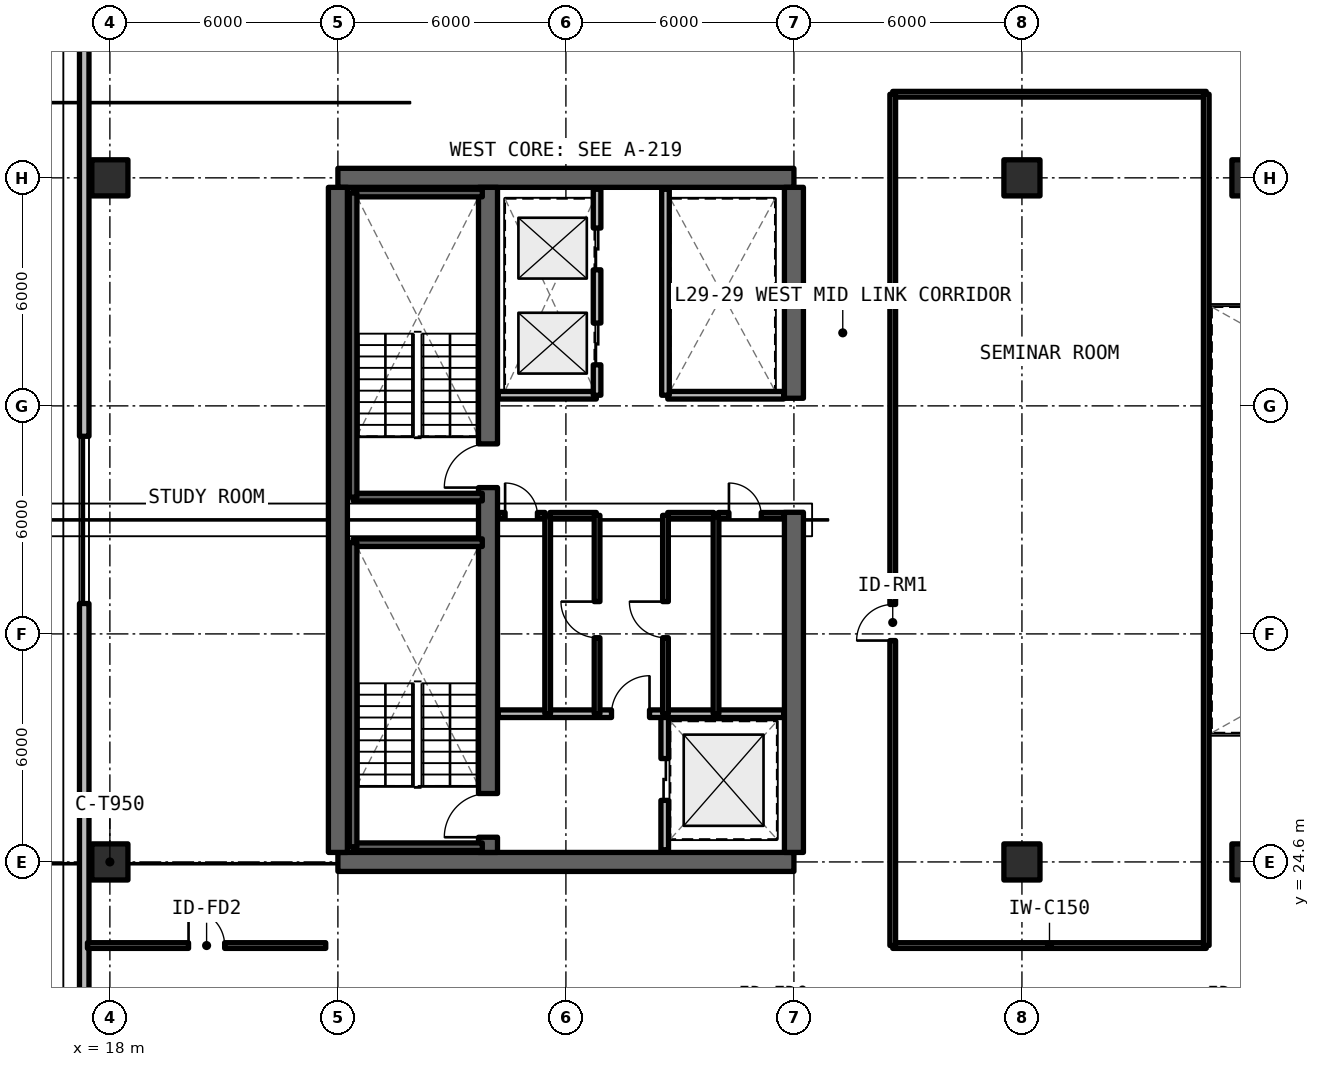
"""IFC4 building model, lengths in metres.
Left out: names, types, materials, properties, quantities, classifications, styles, units other than length and angle.
Written with IfcOpenShell. Run it as: python <this file> out.ifc"""

import sys

from ifc_helpers import new_model, si_unit, direction, frame, frame_2d, origin, origin_2d, place, context, subcontext, project, spatial, rectangle, extrude, element, fill, save


model = new_model("IFC4")
c1 = context("Model", 3, precision=1e-05, world=origin(), true_north=direction((0.0, 1.0)))
c2 = subcontext(c1, "Body", "Model", "MODEL_VIEW")
j1 = project(units=[si_unit("LENGTHUNIT", "METRE"), si_unit("PLANEANGLEUNIT", "RADIAN")], contexts=[c1])
p1 = place(None, origin())
s1 = spatial("IfcSite", under=j1, at=p1, CompositionType="ELEMENT")
p2 = place(p1, origin())
s2 = spatial("IfcBuilding", under=s1, at=p2, CompositionType="ELEMENT")
p3 = place(p2, frame((0.0, 0.0, 105.27)))
s3 = spatial("IfcBuildingStorey", under=s2, at=p3, CompositionType="ELEMENT", Elevation=105.27)
for number, where, z_axis, x_axis in (
    (1, (24.0, 24.6, 0.0), (0.0, 0.0, 1.0), (1.0, 0.0, 0.0)),
    (2, (36.0, 42.6, 0.0), (0.0, 0.0, 1.0), (-1.0, 0.0, 0.0)),
):
    element("IfcWall", number, at=place(p3, frame(where, z_axis=z_axis, x_axis=x_axis)), inside=s3, PredefinedType="SHEAR", context=c2, shape_type="SweptSolid", body=[
        extrude(rectangle(XDim=12.0, YDim=0.5, at=frame_2d((6.0, 0.0))), origin(), (0.0, 0.0, 1.0), 3.3),
    ])
p4 = place(p3, frame((24.0, 24.85, 0.0), z_axis=(0.0, 0.0, 1.0), x_axis=(0.0, 1.0, 0.0)))
e3 = element("IfcWall", 3, at=p4, inside=s3, PredefinedType="SHEAR", context=c2, shape_type="SweptSolid", body=[
    extrude(rectangle(XDim=17.5, YDim=0.5, at=frame_2d((8.75, 0.0))), origin(), (0.0, 0.0, 1.0), 3.3),
])
p5 = place(p3, frame((36.0, 24.85, 0.0), z_axis=(0.0, 0.0, 1.0), x_axis=(0.0, 1.0, 0.0)))
e4 = element("IfcWall", 4, at=p5, inside=s3, PredefinedType="SHEAR", context=c2, shape_type="SweptSolid", body=[
    extrude(rectangle(XDim=8.95, YDim=0.5, at=frame_2d((4.475, 0.0))), origin(), (0.0, 0.0, 1.0), 3.3),
])
p6 = place(p3, frame((36.0, 36.8, 0.0), z_axis=(0.0, 0.0, 1.0), x_axis=(0.0, 1.0, 0.0)))
e5 = element("IfcWall", 5, at=p6, inside=s3, PredefinedType="SHEAR", context=c2, shape_type="SweptSolid", body=[
    extrude(rectangle(XDim=5.55, YDim=0.5, at=frame_2d((2.775, 0.0))), origin(), (0.0, 0.0, 1.0), 3.3),
])
p7 = place(p3, frame((27.95, 24.85, 0.0), z_axis=(0.0, 0.0, 1.0), x_axis=(0.0, 1.0, 0.0)))
e6 = element("IfcWall", 6, at=p7, inside=s3, PredefinedType="SHEAR", context=c2, shape_type="SweptSolid", body=[
    extrude(rectangle(XDim=17.5, YDim=0.5, at=frame_2d((8.75, 0.0))), origin(), (0.0, 0.0, 1.0), 3.3),
])
p8 = place(p7, frame((0.4, 0.0, 0.0)))
e7 = element("IfcOpeningElement", 7, at=p8, cuts=e6, PredefinedType="OPENING", context=c2, shape_type="SweptSolid", body=[
    extrude(rectangle(XDim=1.15, YDim=2.15, at=frame_2d((0.575, 1.075))), frame((0.0, 0.26, 0.0), z_axis=(0.0, -1.0, 0.0), x_axis=(1.0, 0.0, 0.0)), (0.0, 0.0, 1.0), 0.52),
])
p9 = place(p7, frame((9.6, 0.0, 0.0)))
e8 = element("IfcOpeningElement", 8, at=p9, cuts=e6, PredefinedType="OPENING", context=c2, shape_type="SweptSolid", body=[
    extrude(rectangle(XDim=1.15, YDim=2.15, at=frame_2d((0.575, 1.075))), frame((0.0, 0.26, 0.0), z_axis=(0.0, -1.0, 0.0), x_axis=(1.0, 0.0, 0.0)), (0.0, 0.0, 1.0), 0.52),
])
for number, where, z_axis, x_axis in (
    (9, (18.0, 24.6, 0.0), (0.0, 0.0, 1.0), (1.0, 0.0, 0.0)),
    (10, (18.0, 42.6, 0.0), (0.0, 0.0, 1.0), (1.0, 0.0, 0.0)),
    (11, (42.0, 24.6, 0.0), (0.0, 0.0, 1.0), (1.0, 0.0, 0.0)),
    (12, (42.0, 42.6, 0.0), (0.0, 0.0, 1.0), (1.0, 0.0, 0.0)),
    (13, (48.0, 24.6, 0.0), (0.0, 0.0, 1.0), (1.0, 0.0, 0.0)),
    (14, (48.0, 42.6, 0.0), (0.0, 0.0, 1.0), (1.0, 0.0, 0.0)),
):
    element("IfcColumn", number, at=place(p3, frame(where, z_axis=z_axis, x_axis=x_axis)), inside=s3, PredefinedType="COLUMN", context=c2, shape_type="SweptSolid", body=[
        extrude(rectangle(XDim=0.95, YDim=0.95, at=origin_2d()), origin(), (0.0, 0.0, 1.0), 3.3),
    ])
p10 = place(p3, frame((17.325, 53.348, 0.0), z_axis=(0.0, 0.0, 1.0), x_axis=(0.0, -1.0, 0.0)))
e15 = element("IfcWall", 15, at=p10, inside=s3, PredefinedType="SOLIDWALL", context=c2, shape_type="SweptSolid", body=[
    extrude(rectangle(XDim=39.496, YDim=0.25, at=frame_2d((19.748, 0.0))), origin(), (0.0, 0.0, 1.0), 3.08),
])
p11 = place(p10, frame((17.548, 0.0, 0.78)))
e16 = element("IfcOpeningElement", 16, at=p11, cuts=e15, PredefinedType="OPENING", context=c2, shape_type="SweptSolid", body=[
    extrude(rectangle(XDim=4.4, YDim=1.66, at=frame_2d((2.2, 0.83))), frame((0.0, 0.135, 0.0), z_axis=(0.0, -1.0, 0.0), x_axis=(1.0, 0.0, 0.0)), (0.0, 0.0, 1.0), 0.27),
])
p12 = place(p10, frame((35.642, 0.0, 0.78)))
e17 = element("IfcOpeningElement", 17, at=p12, cuts=e15, PredefinedType="OPENING", context=c2, shape_type="SweptSolid", body=[
    extrude(rectangle(XDim=1.4, YDim=1.65, at=frame_2d((0.7, 0.825))), frame((0.0, 0.135, 0.0), z_axis=(0.0, -1.0, 0.0), x_axis=(1.0, 0.0, 0.0)), (0.0, 0.0, 1.0), 0.27),
])
p13 = place(p3, frame((32.6, 24.92, 0.0), z_axis=(0.0, 0.0, 1.0), x_axis=(0.0, 1.0, 0.0)))
e18 = element("IfcWall", 18, at=p13, inside=s3, PredefinedType="SOLIDWALL", context=c2, shape_type="SweptSolid", body=[
    extrude(rectangle(XDim=3.58, YDim=0.2, at=frame_2d((1.79, 0.0))), origin(), (0.0, 0.0, 1.0), 2.35),
])
p14 = place(p13, frame((1.3, 0.0, 0.0)))
e19 = element("IfcOpeningElement", 19, at=p14, cuts=e18, PredefinedType="OPENING", context=c2, shape_type="SweptSolid", body=[
    extrude(rectangle(XDim=1.1, YDim=2.2, at=frame_2d((0.55, 1.1))), frame((0.0, 0.11, 0.0), z_axis=(0.0, -1.0, 0.0), x_axis=(1.0, 0.0, 0.0)), (0.0, 0.0, 1.0), 0.22),
])
p15 = place(p3, frame((28.22, 28.5, 0.0), z_axis=(0.0, 0.0, 1.0), x_axis=(1.0, 0.0, 0.0)))
e20 = element("IfcWall", 20, at=p15, inside=s3, PredefinedType="SOLIDWALL", context=c2, shape_type="SweptSolid", body=[
    extrude(rectangle(XDim=7.51, YDim=0.2, at=frame_2d((3.755, 0.0))), origin(), (0.0, 0.0, 1.0), 2.35),
])
p16 = place(p15, frame((2.98, 0.0, 0.0)))
e21 = element("IfcOpeningElement", 21, at=p16, cuts=e20, PredefinedType="OPENING", context=c2, shape_type="SweptSolid", body=[
    extrude(rectangle(XDim=1.0, YDim=2.15, at=frame_2d((0.5, 1.075))), frame((0.0, 0.11, 0.0), z_axis=(0.0, -1.0, 0.0), x_axis=(1.0, 0.0, 0.0)), (0.0, 0.0, 1.0), 0.22),
])
p17 = place(p3, frame((29.52, 28.5, 0.0), z_axis=(0.0, 0.0, 1.0), x_axis=(0.0, 1.0, 0.0)))
e22 = element("IfcWall", 22, at=p17, inside=s3, PredefinedType="SOLIDWALL", context=c2, shape_type="SweptSolid", body=[
    extrude(rectangle(XDim=5.22, YDim=0.15, at=frame_2d((2.61, 0.0))), origin(), (0.0, 0.0, 1.0), 2.35),
])
p18 = place(p3, frame((28.22, 33.72, 0.0), z_axis=(0.0, 0.0, 1.0), x_axis=(1.0, 0.0, 0.0)))
e23 = element("IfcWall", 23, at=p18, inside=s3, PredefinedType="SOLIDWALL", context=c2, shape_type="SweptSolid", body=[
    extrude(rectangle(XDim=1.23, YDim=0.15, at=frame_2d((0.615, 0.0))), origin(), (0.0, 0.0, 1.0), 2.35),
])
p19 = place(p18, frame((0.18, 0.0, 0.0)))
e24 = element("IfcOpeningElement", 24, at=p19, cuts=e23, PredefinedType="OPENING", context=c2, shape_type="SweptSolid", body=[
    extrude(rectangle(XDim=0.85, YDim=2.1, at=frame_2d((0.425, 1.05))), frame((0.0, 0.085, 0.0), z_axis=(0.0, -1.0, 0.0), x_axis=(1.0, 0.0, 0.0)), (0.0, 0.0, 1.0), 0.17),
])
p20 = place(p3, frame((29.58, 33.72, 0.0), z_axis=(0.0, 0.0, 1.0), x_axis=(1.0, 0.0, 0.0)))
e25 = element("IfcWall", 25, at=p20, inside=s3, PredefinedType="SOLIDWALL", context=c2, shape_type="SweptSolid", body=[
    extrude(rectangle(XDim=1.22, YDim=0.15, at=frame_2d((0.61, 0.0))), origin(), (0.0, 0.0, 1.0), 2.35),
])
p21 = place(p3, frame((30.82, 28.5, 0.0), z_axis=(0.0, 0.0, 1.0), x_axis=(0.0, 1.0, 0.0)))
e26 = element("IfcWall", 26, at=p21, inside=s3, PredefinedType="SOLIDWALL", context=c2, shape_type="SweptSolid", body=[
    extrude(rectangle(XDim=5.22, YDim=0.15, at=frame_2d((2.61, 0.0))), origin(), (0.0, 0.0, 1.0), 2.35),
])
p22 = place(p21, frame((2.0, 0.0, 0.0)))
e27 = element("IfcOpeningElement", 27, at=p22, cuts=e26, PredefinedType="OPENING", context=c2, shape_type="SweptSolid", body=[
    extrude(rectangle(XDim=0.95, YDim=2.15, at=frame_2d((0.475, 1.075))), frame((0.0, 0.085, 0.0), z_axis=(0.0, -1.0, 0.0), x_axis=(1.0, 0.0, 0.0)), (0.0, 0.0, 1.0), 0.17),
])
p23 = place(p3, frame((33.95, 28.5, 0.0), z_axis=(0.0, 0.0, 1.0), x_axis=(0.0, 1.0, 0.0)))
e28 = element("IfcWall", 28, at=p23, inside=s3, PredefinedType="SOLIDWALL", context=c2, shape_type="SweptSolid", body=[
    extrude(rectangle(XDim=5.22, YDim=0.15, at=frame_2d((2.61, 0.0))), origin(), (0.0, 0.0, 1.0), 2.35),
])
p24 = place(p3, frame((32.68, 33.72, 0.0), z_axis=(0.0, 0.0, 1.0), x_axis=(1.0, 0.0, 0.0)))
e29 = element("IfcWall", 29, at=p24, inside=s3, PredefinedType="SOLIDWALL", context=c2, shape_type="SweptSolid", body=[
    extrude(rectangle(XDim=1.21, YDim=0.15, at=frame_2d((0.605, 0.0))), origin(), (0.0, 0.0, 1.0), 2.35),
])
p25 = place(p3, frame((34.01, 33.72, 0.0), z_axis=(0.0, 0.0, 1.0), x_axis=(1.0, 0.0, 0.0)))
e30 = element("IfcWall", 30, at=p25, inside=s3, PredefinedType="SOLIDWALL", context=c2, shape_type="SweptSolid", body=[
    extrude(rectangle(XDim=1.72, YDim=0.15, at=frame_2d((0.86, 0.0))), origin(), (0.0, 0.0, 1.0), 2.35),
])
p26 = place(p25, frame((0.28, 0.0, 0.0)))
e31 = element("IfcOpeningElement", 31, at=p26, cuts=e30, PredefinedType="OPENING", context=c2, shape_type="SweptSolid", body=[
    extrude(rectangle(XDim=0.85, YDim=2.1, at=frame_2d((0.425, 1.05))), frame((0.0, 0.085, 0.0), z_axis=(0.0, -1.0, 0.0), x_axis=(1.0, 0.0, 0.0)), (0.0, 0.0, 1.0), 0.17),
])
p27 = place(p3, frame((32.62, 28.5, 0.0), z_axis=(0.0, 0.0, 1.0), x_axis=(0.0, 1.0, 0.0)))
e32 = element("IfcWall", 32, at=p27, inside=s3, PredefinedType="SOLIDWALL", context=c2, shape_type="SweptSolid", body=[
    extrude(rectangle(XDim=5.22, YDim=0.15, at=frame_2d((2.61, 0.0))), origin(), (0.0, 0.0, 1.0), 2.35),
])
p28 = place(p27, frame((2.0, 0.0, 0.0)))
e33 = element("IfcOpeningElement", 33, at=p28, cuts=e32, PredefinedType="OPENING", context=c2, shape_type="SweptSolid", body=[
    extrude(rectangle(XDim=0.95, YDim=2.15, at=frame_2d((0.475, 1.075))), frame((0.0, 0.085, 0.0), z_axis=(0.0, -1.0, 0.0), x_axis=(1.0, 0.0, 0.0)), (0.0, 0.0, 1.0), 0.17),
])
p29 = place(p3, frame((28.22, 36.88, 0.0), z_axis=(0.0, 0.0, 1.0), x_axis=(1.0, 0.0, 0.0)))
e34 = element("IfcWall", 34, at=p29, inside=s3, PredefinedType="SOLIDWALL", context=c2, shape_type="SweptSolid", body=[
    extrude(rectangle(XDim=2.58, YDim=0.2, at=frame_2d((1.29, 0.0))), origin(), (0.0, 0.0, 1.0), 2.35),
])
p30 = place(p3, frame((30.82, 36.88, 0.0), z_axis=(0.0, 0.0, 1.0), x_axis=(0.0, 1.0, 0.0)))
e35 = element("IfcWall", 35, at=p30, inside=s3, PredefinedType="SOLIDWALL", context=c2, shape_type="SweptSolid", body=[
    extrude(rectangle(XDim=5.42, YDim=0.2, at=frame_2d((2.71, 0.0))), origin(), (0.0, 0.0, 1.0), 2.35),
])
p31 = place(p30, frame((0.8, 0.0, 0.0)))
e36 = element("IfcOpeningElement", 36, at=p31, cuts=e35, PredefinedType="OPENING", context=c2, shape_type="SweptSolid", body=[
    extrude(rectangle(XDim=1.1, YDim=2.2, at=frame_2d((0.55, 1.1))), frame((0.0, 0.11, 0.0), z_axis=(0.0, -1.0, 0.0), x_axis=(1.0, 0.0, 0.0)), (0.0, 0.0, 1.0), 0.22),
])
p32 = place(p30, frame((3.3, 0.0, 0.0)))
e37 = element("IfcOpeningElement", 37, at=p32, cuts=e35, PredefinedType="OPENING", context=c2, shape_type="SweptSolid", body=[
    extrude(rectangle(XDim=1.1, YDim=2.2, at=frame_2d((0.55, 1.1))), frame((0.0, 0.11, 0.0), z_axis=(0.0, -1.0, 0.0), x_axis=(1.0, 0.0, 0.0)), (0.0, 0.0, 1.0), 0.22),
])
p33 = place(p3, frame((32.68, 36.88, 0.0), z_axis=(0.0, 0.0, 1.0), x_axis=(1.0, 0.0, 0.0)))
e38 = element("IfcWall", 38, at=p33, inside=s3, PredefinedType="SOLIDWALL", context=c2, shape_type="SweptSolid", body=[
    extrude(rectangle(XDim=3.05, YDim=0.2, at=frame_2d((1.525, 0.0))), origin(), (0.0, 0.0, 1.0), 2.35),
])
p34 = place(p3, frame((32.62, 36.88, 0.0), z_axis=(0.0, 0.0, 1.0), x_axis=(0.0, 1.0, 0.0)))
e39 = element("IfcWall", 39, at=p34, inside=s3, PredefinedType="SOLIDWALL", context=c2, shape_type="SweptSolid", body=[
    extrude(rectangle(XDim=5.42, YDim=0.2, at=frame_2d((2.71, 0.0))), origin(), (0.0, 0.0, 1.0), 2.35),
])
for number, where, z_axis, x_axis in (
    (40, (38.6, 22.4, 0.0), (0.0, 0.0, 1.0), (1.0, 0.0, 0.0)),
    (41, (38.6, 44.8, 0.0), (0.0, 0.0, 1.0), (1.0, 0.0, 0.0)),
):
    element("IfcWall", number, at=place(p3, frame(where, z_axis=z_axis, x_axis=x_axis)), inside=s3, PredefinedType="SOLIDWALL", context=c2, shape_type="SweptSolid", body=[
        extrude(rectangle(XDim=8.25, YDim=0.15, at=frame_2d((4.125, 0.0))), origin(), (0.0, 0.0, 1.0), 2.35),
    ])
p35 = place(p3, frame((38.6, 22.4, 0.0), z_axis=(0.0, 0.0, 1.0), x_axis=(0.0, 1.0, 0.0)))
e42 = element("IfcWall", 42, at=p35, inside=s3, PredefinedType="SOLIDWALL", context=c2, shape_type="SweptSolid", body=[
    extrude(rectangle(XDim=22.4, YDim=0.15, at=frame_2d((11.2, 0.0))), origin(), (0.0, 0.0, 1.0), 2.35),
])
p36 = place(p35, frame((8.025, 0.0, 0.0)))
e43 = element("IfcOpeningElement", 43, at=p36, cuts=e42, PredefinedType="OPENING", context=c2, shape_type="SweptSolid", body=[
    extrude(rectangle(XDim=0.95, YDim=2.15, at=frame_2d((0.475, 1.075))), frame((0.0, 0.085, 0.0), z_axis=(0.0, -1.0, 0.0), x_axis=(1.0, 0.0, 0.0)), (0.0, 0.0, 1.0), 0.17),
])
p37 = place(p3, frame((46.85, 22.4, 0.0), z_axis=(0.0, 0.0, 1.0), x_axis=(0.0, 1.0, 0.0)))
e44 = element("IfcWall", 44, at=p37, inside=s3, PredefinedType="SOLIDWALL", context=c2, shape_type="SweptSolid", body=[
    extrude(rectangle(XDim=22.4, YDim=0.15, at=frame_2d((11.2, 0.0))), origin(), (0.0, 0.0, 1.0), 2.35),
])
p38 = place(p3, frame((17.41, 22.4, 0.0), z_axis=(0.0, 0.0, 1.0), x_axis=(1.0, 0.0, 0.0)))
e45 = element("IfcWall", 45, at=p38, inside=s3, PredefinedType="SOLIDWALL", context=c2, shape_type="SweptSolid", body=[
    extrude(rectangle(XDim=6.27, YDim=0.15, at=frame_2d((3.135, 0.0))), origin(), (0.0, 0.0, 1.0), 2.35),
])
p39 = place(p38, frame((2.66, 0.0, 0.0)))
e46 = element("IfcOpeningElement", 46, at=p39, cuts=e45, PredefinedType="OPENING", context=c2, shape_type="SweptSolid", body=[
    extrude(rectangle(XDim=0.95, YDim=2.15, at=frame_2d((0.475, 1.075))), frame((0.0, 0.085, 0.0), z_axis=(0.0, -1.0, 0.0), x_axis=(1.0, 0.0, 0.0)), (0.0, 0.0, 1.0), 0.17),
])
for number, where, z_axis, x_axis in (
    (47, (24.4, 25.0, 0.0), (0.0, 0.0, 1.0), (1.0, 0.0, 0.0)),
    (48, (27.8, 33.0, 0.0), (0.0, 0.0, 1.0), (-1.0, 0.0, 0.0)),
):
    element("IfcWall", number, at=place(p3, frame(where, z_axis=z_axis, x_axis=x_axis)), inside=s3, PredefinedType="SOLIDWALL", context=c2, shape_type="SweptSolid", body=[
        extrude(rectangle(XDim=3.4, YDim=0.2, at=frame_2d((1.7, 0.0))), origin(), (0.0, 0.0, 1.0), 3.3),
    ])
p40 = place(p3, frame((24.4, 33.0, 0.0), z_axis=(0.0, 0.0, 1.0), x_axis=(0.0, -1.0, 0.0)))
e49 = element("IfcWall", 49, at=p40, inside=s3, PredefinedType="SOLIDWALL", context=c2, shape_type="SweptSolid", body=[
    extrude(rectangle(XDim=8.0, YDim=0.2, at=frame_2d((4.0, 0.0))), origin(), (0.0, 0.0, 1.0), 3.3),
])
for number, where, z_axis, x_axis in (
    (50, (24.4, 34.2, 0.0), (0.0, 0.0, 1.0), (1.0, 0.0, 0.0)),
    (51, (27.8, 42.2, 0.0), (0.0, 0.0, 1.0), (-1.0, 0.0, 0.0)),
):
    element("IfcWall", number, at=place(p3, frame(where, z_axis=z_axis, x_axis=x_axis)), inside=s3, PredefinedType="SOLIDWALL", context=c2, shape_type="SweptSolid", body=[
        extrude(rectangle(XDim=3.4, YDim=0.2, at=frame_2d((1.7, 0.0))), origin(), (0.0, 0.0, 1.0), 3.3),
    ])
p41 = place(p3, frame((24.4, 42.2, 0.0), z_axis=(0.0, 0.0, 1.0), x_axis=(0.0, -1.0, 0.0)))
e52 = element("IfcWall", 52, at=p41, inside=s3, PredefinedType="SOLIDWALL", context=c2, shape_type="SweptSolid", body=[
    extrude(rectangle(XDim=8.0, YDim=0.2, at=frame_2d((4.0, 0.0))), origin(), (0.0, 0.0, 1.0), 3.3),
])
p42 = place(p11, origin())
e53 = element("IfcWindow", 53, at=p42, inside=s3, PartitioningType="SINGLE_PANEL", PredefinedType="WINDOW", context=c2, shape_type="SweptSolid", body=[
    extrude(rectangle(XDim=4.4, YDim=1.66, at=frame_2d((2.2, 0.83))), frame((0.0, 0.03, 0.0), z_axis=(0.0, -1.0, 0.0), x_axis=(1.0, 0.0, 0.0)), (0.0, 0.0, 1.0), 0.06),
])
fill(e16, e53)
p43 = place(p14, origin())
e54 = element("IfcDoor", 54, at=p43, inside=s3, OperationType="SLIDING_TO_LEFT", PredefinedType="DOOR", context=c2, shape_type="SweptSolid", body=[
    extrude(rectangle(XDim=1.1, YDim=2.2, at=frame_2d((0.55, 1.1))), frame((0.0, 0.025, 0.0), z_axis=(0.0, -1.0, 0.0), x_axis=(1.0, 0.0, 0.0)), (0.0, 0.0, 1.0), 0.05),
])
fill(e19, e54)
p44 = place(p16, origin())
e55 = element("IfcDoor", 55, at=p44, inside=s3, OperationType="SINGLE_SWING_RIGHT", PredefinedType="DOOR", context=c2, shape_type="SweptSolid", body=[
    extrude(rectangle(XDim=1.0, YDim=2.15, at=frame_2d((0.5, 1.075))), frame((0.0, 0.025, 0.0), z_axis=(0.0, -1.0, 0.0), x_axis=(1.0, 0.0, 0.0)), (0.0, 0.0, 1.0), 0.05),
])
fill(e21, e55)
p45 = place(p19, origin())
e56 = element("IfcDoor", 56, at=p45, inside=s3, OperationType="SINGLE_SWING_LEFT", PredefinedType="DOOR", context=c2, shape_type="SweptSolid", body=[
    extrude(rectangle(XDim=0.85, YDim=2.1, at=frame_2d((0.425, 1.05))), frame((0.0, 0.025, 0.0), z_axis=(0.0, -1.0, 0.0), x_axis=(1.0, 0.0, 0.0)), (0.0, 0.0, 1.0), 0.05),
])
fill(e24, e56)
p46 = place(p22, origin())
e57 = element("IfcDoor", 57, at=p46, inside=s3, OperationType="SINGLE_SWING_RIGHT", PredefinedType="DOOR", context=c2, shape_type="SweptSolid", body=[
    extrude(rectangle(XDim=0.95, YDim=2.15, at=frame_2d((0.475, 1.075))), frame((0.0, 0.025, 0.0), z_axis=(0.0, -1.0, 0.0), x_axis=(1.0, 0.0, 0.0)), (0.0, 0.0, 1.0), 0.05),
])
fill(e27, e57)
p47 = place(p26, origin())
e58 = element("IfcDoor", 58, at=p47, inside=s3, OperationType="SINGLE_SWING_LEFT", PredefinedType="DOOR", context=c2, shape_type="SweptSolid", body=[
    extrude(rectangle(XDim=0.85, YDim=2.1, at=frame_2d((0.425, 1.05))), frame((0.0, 0.025, 0.0), z_axis=(0.0, -1.0, 0.0), x_axis=(1.0, 0.0, 0.0)), (0.0, 0.0, 1.0), 0.05),
])
fill(e31, e58)
p48 = place(p28, origin())
e59 = element("IfcDoor", 59, at=p48, inside=s3, OperationType="SINGLE_SWING_RIGHT", PredefinedType="DOOR", context=c2, shape_type="SweptSolid", body=[
    extrude(rectangle(XDim=0.95, YDim=2.15, at=frame_2d((0.475, 1.075))), frame((0.0, 0.025, 0.0), z_axis=(0.0, -1.0, 0.0), x_axis=(1.0, 0.0, 0.0)), (0.0, 0.0, 1.0), 0.05),
])
fill(e33, e59)
p49 = place(p31, origin())
e60 = element("IfcDoor", 60, at=p49, inside=s3, OperationType="SLIDING_TO_LEFT", PredefinedType="DOOR", context=c2, shape_type="SweptSolid", body=[
    extrude(rectangle(XDim=1.1, YDim=2.2, at=frame_2d((0.55, 1.1))), frame((0.0, 0.025, 0.0), z_axis=(0.0, -1.0, 0.0), x_axis=(1.0, 0.0, 0.0)), (0.0, 0.0, 1.0), 0.05),
])
fill(e36, e60)
p50 = place(p32, origin())
e61 = element("IfcDoor", 61, at=p50, inside=s3, OperationType="SLIDING_TO_RIGHT", PredefinedType="DOOR", context=c2, shape_type="SweptSolid", body=[
    extrude(rectangle(XDim=1.1, YDim=2.2, at=frame_2d((0.55, 1.1))), frame((0.0, 0.025, 0.0), z_axis=(0.0, -1.0, 0.0), x_axis=(1.0, 0.0, 0.0)), (0.0, 0.0, 1.0), 0.05),
])
fill(e37, e61)
p51 = place(p36, origin())
e62 = element("IfcDoor", 62, at=p51, inside=s3, OperationType="SINGLE_SWING_LEFT", PredefinedType="DOOR", context=c2, shape_type="SweptSolid", body=[
    extrude(rectangle(XDim=0.95, YDim=2.15, at=frame_2d((0.475, 1.075))), frame((0.0, 0.025, 0.0), z_axis=(0.0, -1.0, 0.0), x_axis=(1.0, 0.0, 0.0)), (0.0, 0.0, 1.0), 0.05),
])
fill(e43, e62)
p52 = place(p39, origin())
e63 = element("IfcDoor", 63, at=p52, inside=s3, OperationType="SINGLE_SWING_LEFT", PredefinedType="DOOR", context=c2, shape_type="SweptSolid", body=[
    extrude(rectangle(XDim=0.95, YDim=2.15, at=frame_2d((0.475, 1.075))), frame((0.0, 0.025, 0.0), z_axis=(0.0, -1.0, 0.0), x_axis=(1.0, 0.0, 0.0)), (0.0, 0.0, 1.0), 0.05),
])
fill(e46, e63)
p53 = place(p8, origin())
e64 = element("IfcDoor", 64, at=p53, inside=s3, OperationType="SINGLE_SWING_RIGHT", PredefinedType="DOOR", context=c2, shape_type="SweptSolid", body=[
    extrude(rectangle(XDim=1.15, YDim=2.15, at=frame_2d((0.575, 1.075))), frame((0.0, 0.025, 0.0), z_axis=(0.0, -1.0, 0.0), x_axis=(1.0, 0.0, 0.0)), (0.0, 0.0, 1.0), 0.05),
])
fill(e7, e64)
p54 = place(p9, origin())
e65 = element("IfcDoor", 65, at=p54, inside=s3, OperationType="SINGLE_SWING_LEFT", PredefinedType="DOOR", context=c2, shape_type="SweptSolid", body=[
    extrude(rectangle(XDim=1.15, YDim=2.15, at=frame_2d((0.575, 1.075))), frame((0.0, 0.025, 0.0), z_axis=(0.0, -1.0, 0.0), x_axis=(1.0, 0.0, 0.0)), (0.0, 0.0, 1.0), 0.05),
])
fill(e8, e65)
save(model, sys.argv[1])
